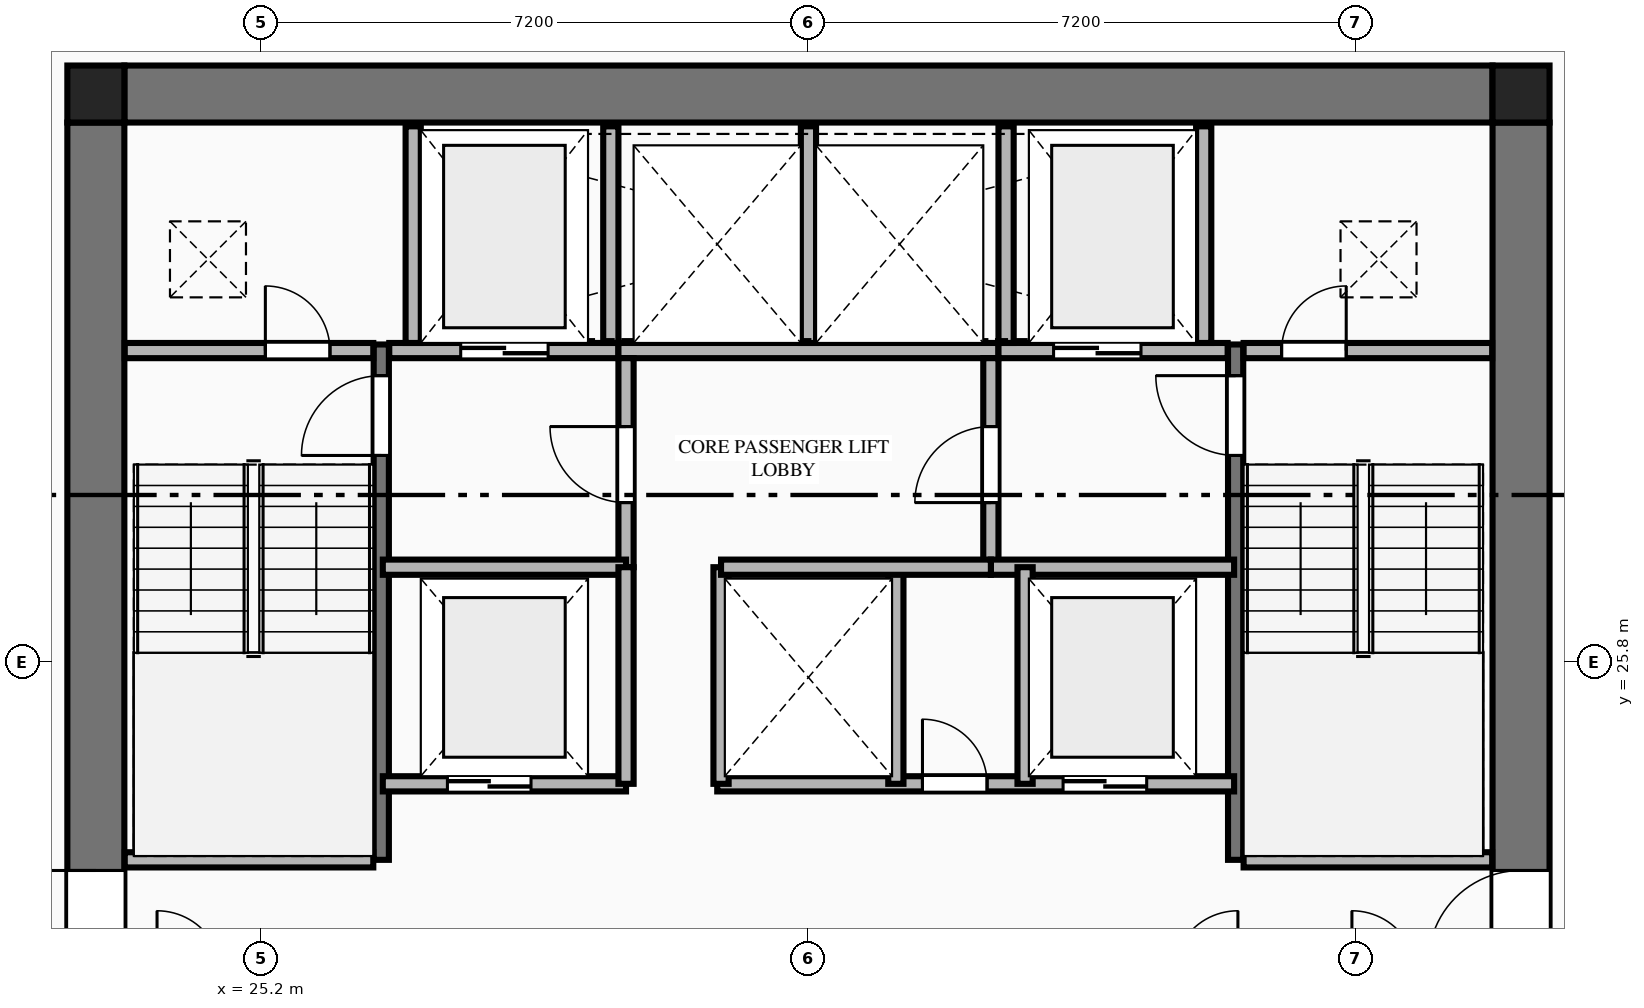
"""IFC4 building model, lengths in metres.
Left out: names, types, materials, properties, quantities, classifications, styles, units other than length and angle.
Written with IfcOpenShell. Run it as: python <this file> out.ifc"""

import sys

from ifc_helpers import new_model, si_unit, direction, frame, frame_2d, origin, origin_2d, place, context, subcontext, project, spatial, rectangle, extrude, element, fill, save


model = new_model("IFC4")
c1 = context("Model", 3, precision=1e-05, world=origin(), true_north=direction((0.0, 1.0)))
c2 = subcontext(c1, "Body", "Model", "MODEL_VIEW")
j1 = project(units=[si_unit("LENGTHUNIT", "METRE"), si_unit("PLANEANGLEUNIT", "RADIAN")], contexts=[c1])
p1 = place(None, origin())
s1 = spatial("IfcSite", under=j1, at=p1, CompositionType="ELEMENT")
p2 = place(p1, origin())
s2 = spatial("IfcBuilding", under=s1, at=p2, CompositionType="ELEMENT")
p3 = place(p2, frame((0.0, 0.0, 133.9)))
s3 = spatial("IfcBuildingStorey", under=s2, at=p3, CompositionType="ELEMENT", Elevation=133.9)
for number, where, z_axis, x_axis in (
    (1, (41.775, 33.275, 0.0), (0.0, 0.0, 1.0), (1.0, 0.0, 0.0)),
    (2, (23.025, 33.275, 0.0), (0.0, 0.0, 1.0), (1.0, 0.0, 0.0)),
):
    element("IfcColumn", number, at=place(p3, frame(where, z_axis=z_axis, x_axis=x_axis)), inside=s3, PredefinedType="COLUMN", context=c2, shape_type="SweptSolid", body=[
        extrude(rectangle(XDim=0.75, YDim=0.75, at=origin_2d()), origin(), (0.0, 0.0, 1.0), 3.55),
    ])
p4 = place(p3, frame((23.4, 33.275, 0.0), z_axis=(0.0, 0.0, 1.0), x_axis=(1.0, 0.0, 0.0)))
e3 = element("IfcWall", 3, at=p4, inside=s3, PredefinedType="SHEAR", context=c2, shape_type="SweptSolid", body=[
    extrude(rectangle(XDim=18.0, YDim=0.75, at=frame_2d((9.0, 0.0))), origin(), (0.0, 0.0, 1.0), 3.34),
])
p5 = place(p3, frame((23.025, 18.9, 0.0), z_axis=(0.0, 0.0, 1.0), x_axis=(0.0, 1.0, 0.0)))
e4 = element("IfcWall", 4, at=p5, inside=s3, PredefinedType="SHEAR", context=c2, shape_type="SweptSolid", body=[
    extrude(rectangle(XDim=14.0, YDim=0.75, at=frame_2d((7.0, 0.0))), origin(), (0.0, 0.0, 1.0), 3.34),
])
p6 = place(p5, frame((2.94, 0.0, 0.0)))
e5 = element("IfcOpeningElement", 5, at=p6, cuts=e4, PredefinedType="OPENING", context=c2, shape_type="SweptSolid", body=[
    extrude(rectangle(XDim=1.22, YDim=2.25, at=frame_2d((0.61, 1.125))), frame((0.0, 0.385, 0.0), z_axis=(0.0, -1.0, 0.0), x_axis=(1.0, 0.0, 0.0)), (0.0, 0.0, 1.0), 0.77),
])
p7 = place(p3, frame((41.775, 18.9, 0.0), z_axis=(0.0, 0.0, 1.0), x_axis=(0.0, 1.0, 0.0)))
e6 = element("IfcWall", 6, at=p7, inside=s3, PredefinedType="SHEAR", context=c2, shape_type="SweptSolid", body=[
    extrude(rectangle(XDim=14.0, YDim=0.75, at=frame_2d((7.0, 0.0))), origin(), (0.0, 0.0, 1.0), 3.34),
])
p8 = place(p7, frame((2.94, 0.0, 0.0)))
e7 = element("IfcOpeningElement", 7, at=p8, cuts=e6, PredefinedType="OPENING", context=c2, shape_type="SweptSolid", body=[
    extrude(rectangle(XDim=1.22, YDim=2.25, at=frame_2d((0.61, 1.125))), frame((0.0, 0.385, 0.0), z_axis=(0.0, -1.0, 0.0), x_axis=(1.0, 0.0, 0.0)), (0.0, 0.0, 1.0), 0.77),
])
p9 = place(p3, frame((26.78, 23.2, 0.0), z_axis=(0.0, 0.0, 1.0), x_axis=(0.0, 1.0, 0.0)))
e8 = element("IfcWall", 8, at=p9, inside=s3, PredefinedType="SHEAR", context=c2, shape_type="SweptSolid", body=[
    extrude(rectangle(XDim=6.78, YDim=0.2, at=frame_2d((3.39, 0.0))), origin(), (0.0, 0.0, 1.0), 3.55),
])
p10 = place(p9, frame((5.32, 0.0, 0.0)))
e9 = element("IfcOpeningElement", 9, at=p10, cuts=e8, PredefinedType="OPENING", context=c2, shape_type="SweptSolid", body=[
    extrude(rectangle(XDim=1.05, YDim=2.15, at=frame_2d((0.525, 1.075))), frame((0.0, 0.11, 0.0), z_axis=(0.0, -1.0, 0.0), x_axis=(1.0, 0.0, 0.0)), (0.0, 0.0, 1.0), 0.22),
])
p11 = place(p3, frame((23.405, 23.2, 0.0), z_axis=(0.0, 0.0, 1.0), x_axis=(1.0, 0.0, 0.0)))
e10 = element("IfcWall", 10, at=p11, inside=s3, PredefinedType="PLUMBINGWALL", context=c2, shape_type="SweptSolid", body=[
    extrude(rectangle(XDim=3.27, YDim=0.2, at=frame_2d((1.635, 0.0))), origin(), (0.0, 0.0, 1.0), 3.34),
])
p12 = place(p3, frame((38.02, 23.2, 0.0), z_axis=(0.0, 0.0, 1.0), x_axis=(0.0, 1.0, 0.0)))
e11 = element("IfcWall", 11, at=p12, inside=s3, PredefinedType="SHEAR", context=c2, shape_type="SweptSolid", body=[
    extrude(rectangle(XDim=6.78, YDim=0.2, at=frame_2d((3.39, 0.0))), origin(), (0.0, 0.0, 1.0), 3.55),
])
p13 = place(p12, frame((5.32, 0.0, 0.0)))
e12 = element("IfcOpeningElement", 12, at=p13, cuts=e11, PredefinedType="OPENING", context=c2, shape_type="SweptSolid", body=[
    extrude(rectangle(XDim=1.05, YDim=2.15, at=frame_2d((0.525, 1.075))), frame((0.0, 0.11, 0.0), z_axis=(0.0, -1.0, 0.0), x_axis=(1.0, 0.0, 0.0)), (0.0, 0.0, 1.0), 0.22),
])
p14 = place(p3, frame((38.125, 23.2, 0.0), z_axis=(0.0, 0.0, 1.0), x_axis=(1.0, 0.0, 0.0)))
e13 = element("IfcWall", 13, at=p14, inside=s3, PredefinedType="PLUMBINGWALL", context=c2, shape_type="SweptSolid", body=[
    extrude(rectangle(XDim=3.27, YDim=0.2, at=frame_2d((1.635, 0.0))), origin(), (0.0, 0.0, 1.0), 3.34),
])
p15 = place(p3, frame((23.405, 29.9, 0.0), z_axis=(0.0, 0.0, 1.0), x_axis=(1.0, 0.0, 0.0)))
e14 = element("IfcWall", 14, at=p15, inside=s3, PredefinedType="PLUMBINGWALL", context=c2, shape_type="SweptSolid", body=[
    extrude(rectangle(XDim=3.27, YDim=0.2, at=frame_2d((1.635, 0.0))), origin(), (0.0, 0.0, 1.0), 3.34),
])
p16 = place(p15, frame((1.85, 0.0, 0.0)))
e15 = element("IfcOpeningElement", 15, at=p16, cuts=e14, PredefinedType="OPENING", context=c2, shape_type="SweptSolid", body=[
    extrude(rectangle(XDim=0.85, YDim=2.05, at=frame_2d((0.425, 1.025))), frame((0.0, 0.11, 0.0), z_axis=(0.0, -1.0, 0.0), x_axis=(1.0, 0.0, 0.0)), (0.0, 0.0, 1.0), 0.22),
])
p17 = place(p3, frame((26.885, 29.9, 0.0), z_axis=(0.0, 0.0, 1.0), x_axis=(1.0, 0.0, 0.0)))
e16 = element("IfcWall", 16, at=p17, inside=s3, PredefinedType="PLUMBINGWALL", context=c2, shape_type="SweptSolid", body=[
    extrude(rectangle(XDim=3.015, YDim=0.2, at=frame_2d((1.507, 0.0))), origin(), (0.0, 0.0, 1.0), 3.34),
])
p18 = place(p17, frame((0.94, 0.0, 0.0)))
e17 = element("IfcOpeningElement", 17, at=p18, cuts=e16, PredefinedType="OPENING", context=c2, shape_type="SweptSolid", body=[
    extrude(rectangle(XDim=1.15, YDim=2.2, at=frame_2d((0.575, 1.1))), frame((0.0, 0.11, 0.0), z_axis=(0.0, -1.0, 0.0), x_axis=(1.0, 0.0, 0.0)), (0.0, 0.0, 1.0), 0.22),
])
p19 = place(p3, frame((29.9, 29.9, 0.0), z_axis=(0.0, 0.0, 1.0), x_axis=(1.0, 0.0, 0.0)))
e18 = element("IfcWall", 18, at=p19, inside=s3, PredefinedType="PLUMBINGWALL", context=c2, shape_type="SweptSolid", body=[
    extrude(rectangle(XDim=5.0, YDim=0.2, at=frame_2d((2.5, 0.0))), origin(), (0.0, 0.0, 1.0), 3.34),
])
p20 = place(p3, frame((34.9, 29.9, 0.0), z_axis=(0.0, 0.0, 1.0), x_axis=(1.0, 0.0, 0.0)))
e19 = element("IfcWall", 19, at=p20, inside=s3, PredefinedType="PLUMBINGWALL", context=c2, shape_type="SweptSolid", body=[
    extrude(rectangle(XDim=3.015, YDim=0.2, at=frame_2d((1.508, 0.0))), origin(), (0.0, 0.0, 1.0), 3.34),
])
p21 = place(p20, frame((0.725, 0.0, 0.0)))
e20 = element("IfcOpeningElement", 20, at=p21, cuts=e19, PredefinedType="OPENING", context=c2, shape_type="SweptSolid", body=[
    extrude(rectangle(XDim=1.15, YDim=2.2, at=frame_2d((0.575, 1.1))), frame((0.0, 0.11, 0.0), z_axis=(0.0, -1.0, 0.0), x_axis=(1.0, 0.0, 0.0)), (0.0, 0.0, 1.0), 0.22),
])
p22 = place(p3, frame((38.125, 29.9, 0.0), z_axis=(0.0, 0.0, 1.0), x_axis=(1.0, 0.0, 0.0)))
e21 = element("IfcWall", 21, at=p22, inside=s3, PredefinedType="PLUMBINGWALL", context=c2, shape_type="SweptSolid", body=[
    extrude(rectangle(XDim=3.27, YDim=0.2, at=frame_2d((1.635, 0.0))), origin(), (0.0, 0.0, 1.0), 3.34),
])
p23 = place(p22, frame((0.5, 0.0, 0.0)))
e22 = element("IfcOpeningElement", 22, at=p23, cuts=e21, PredefinedType="OPENING", context=c2, shape_type="SweptSolid", body=[
    extrude(rectangle(XDim=0.85, YDim=2.05, at=frame_2d((0.425, 1.025))), frame((0.0, 0.11, 0.0), z_axis=(0.0, -1.0, 0.0), x_axis=(1.0, 0.0, 0.0)), (0.0, 0.0, 1.0), 0.22),
])
for number, where, z_axis, x_axis in (
    (23, (27.2, 30.0, 0.0), (0.0, 0.0, 1.0), (0.0, 1.0, 0.0)),
    (24, (29.8, 30.0, 0.0), (0.0, 0.0, 1.0), (0.0, 1.0, 0.0)),
    (25, (32.4, 30.0, 0.0), (0.0, 0.0, 1.0), (0.0, 1.0, 0.0)),
    (26, (35.0, 30.0, 0.0), (0.0, 0.0, 1.0), (0.0, 1.0, 0.0)),
    (27, (37.6, 30.0, 0.0), (0.0, 0.0, 1.0), (0.0, 1.0, 0.0)),
):
    element("IfcWall", number, at=place(p3, frame(where, z_axis=z_axis, x_axis=x_axis)), inside=s3, PredefinedType="PLUMBINGWALL", context=c2, shape_type="SweptSolid", body=[
        extrude(rectangle(XDim=2.85, YDim=0.2, at=frame_2d((1.425, 0.0))), origin(), (0.0, 0.0, 1.0), 3.34),
    ])
p24 = place(p3, frame((30.0, 27.05, 0.0), z_axis=(0.0, 0.0, 1.0), x_axis=(0.0, 1.0, 0.0)))
e28 = element("IfcWall", 28, at=p24, inside=s3, PredefinedType="PLUMBINGWALL", context=c2, shape_type="SweptSolid", body=[
    extrude(rectangle(XDim=2.75, YDim=0.2, at=frame_2d((1.375, 0.0))), origin(), (0.0, 0.0, 1.0), 3.34),
])
p25 = place(p24, frame((0.85, 0.0, 0.0)))
e29 = element("IfcOpeningElement", 29, at=p25, cuts=e28, PredefinedType="OPENING", context=c2, shape_type="SweptSolid", body=[
    extrude(rectangle(XDim=1.0, YDim=2.15, at=frame_2d((0.5, 1.075))), frame((0.0, 0.11, 0.0), z_axis=(0.0, -1.0, 0.0), x_axis=(1.0, 0.0, 0.0)), (0.0, 0.0, 1.0), 0.22),
])
p26 = place(p3, frame((26.8, 27.05, 0.0), z_axis=(0.0, 0.0, 1.0), x_axis=(1.0, 0.0, 0.0)))
e30 = element("IfcWall", 30, at=p26, inside=s3, PredefinedType="PLUMBINGWALL", context=c2, shape_type="SweptSolid", body=[
    extrude(rectangle(XDim=3.2, YDim=0.2, at=frame_2d((1.6, 0.0))), origin(), (0.0, 0.0, 1.0), 3.34),
])
p27 = place(p3, frame((34.8, 27.05, 0.0), z_axis=(0.0, 0.0, 1.0), x_axis=(0.0, 1.0, 0.0)))
e31 = element("IfcWall", 31, at=p27, inside=s3, PredefinedType="PLUMBINGWALL", context=c2, shape_type="SweptSolid", body=[
    extrude(rectangle(XDim=2.75, YDim=0.2, at=frame_2d((1.375, 0.0))), origin(), (0.0, 0.0, 1.0), 3.34),
])
p28 = place(p27, frame((0.85, 0.0, 0.0)))
e32 = element("IfcOpeningElement", 32, at=p28, cuts=e31, PredefinedType="OPENING", context=c2, shape_type="SweptSolid", body=[
    extrude(rectangle(XDim=1.0, YDim=2.15, at=frame_2d((0.5, 1.075))), frame((0.0, 0.11, 0.0), z_axis=(0.0, -1.0, 0.0), x_axis=(1.0, 0.0, 0.0)), (0.0, 0.0, 1.0), 0.22),
])
p29 = place(p3, frame((34.8, 27.05, 0.0), z_axis=(0.0, 0.0, 1.0), x_axis=(1.0, 0.0, 0.0)))
e33 = element("IfcWall", 33, at=p29, inside=s3, PredefinedType="PLUMBINGWALL", context=c2, shape_type="SweptSolid", body=[
    extrude(rectangle(XDim=3.2, YDim=0.2, at=frame_2d((1.6, 0.0))), origin(), (0.0, 0.0, 1.0), 3.34),
])
p30 = place(p3, frame((26.8, 24.2, 0.0), z_axis=(0.0, 0.0, 1.0), x_axis=(1.0, 0.0, 0.0)))
e34 = element("IfcWall", 34, at=p30, inside=s3, PredefinedType="PLUMBINGWALL", context=c2, shape_type="SweptSolid", body=[
    extrude(rectangle(XDim=3.2, YDim=0.2, at=frame_2d((1.6, 0.0))), origin(), (0.0, 0.0, 1.0), 3.34),
])
p31 = place(p30, frame((0.85, 0.0, 0.0)))
e35 = element("IfcOpeningElement", 35, at=p31, cuts=e34, PredefinedType="OPENING", context=c2, shape_type="SweptSolid", body=[
    extrude(rectangle(XDim=1.1, YDim=2.2, at=frame_2d((0.55, 1.1))), frame((0.0, 0.11, 0.0), z_axis=(0.0, -1.0, 0.0), x_axis=(1.0, 0.0, 0.0)), (0.0, 0.0, 1.0), 0.22),
])
p32 = place(p3, frame((30.0, 24.2, 0.0), z_axis=(0.0, 0.0, 1.0), x_axis=(0.0, 1.0, 0.0)))
e36 = element("IfcWall", 36, at=p32, inside=s3, PredefinedType="PLUMBINGWALL", context=c2, shape_type="SweptSolid", body=[
    extrude(rectangle(XDim=2.85, YDim=0.2, at=frame_2d((1.425, 0.0))), origin(), (0.0, 0.0, 1.0), 3.34),
])
p33 = place(p3, frame((31.2, 24.2, 0.0), z_axis=(0.0, 0.0, 1.0), x_axis=(1.0, 0.0, 0.0)))
e37 = element("IfcWall", 37, at=p33, inside=s3, PredefinedType="PLUMBINGWALL", context=c2, shape_type="SweptSolid", body=[
    extrude(rectangle(XDim=6.8, YDim=0.2, at=frame_2d((3.4, 0.0))), origin(), (0.0, 0.0, 1.0), 3.34),
])
p34 = place(p33, frame((2.7, 0.0, 0.0)))
e38 = element("IfcOpeningElement", 38, at=p34, cuts=e37, PredefinedType="OPENING", context=c2, shape_type="SweptSolid", body=[
    extrude(rectangle(XDim=0.85, YDim=2.05, at=frame_2d((0.425, 1.025))), frame((0.0, 0.11, 0.0), z_axis=(0.0, -1.0, 0.0), x_axis=(1.0, 0.0, 0.0)), (0.0, 0.0, 1.0), 0.22),
])
p35 = place(p33, frame((4.55, 0.0, 0.0)))
e39 = element("IfcOpeningElement", 39, at=p35, cuts=e37, PredefinedType="OPENING", context=c2, shape_type="SweptSolid", body=[
    extrude(rectangle(XDim=1.1, YDim=2.2, at=frame_2d((0.55, 1.1))), frame((0.0, 0.11, 0.0), z_axis=(0.0, -1.0, 0.0), x_axis=(1.0, 0.0, 0.0)), (0.0, 0.0, 1.0), 0.22),
])
for number, where, z_axis, x_axis in (
    (40, (31.25, 24.2, 0.0), (0.0, 0.0, 1.0), (0.0, 1.0, 0.0)),
    (41, (33.55, 24.2, 0.0), (0.0, 0.0, 1.0), (0.0, 1.0, 0.0)),
    (42, (35.25, 24.2, 0.0), (0.0, 0.0, 1.0), (0.0, 1.0, 0.0)),
):
    element("IfcWall", number, at=place(p3, frame(where, z_axis=z_axis, x_axis=x_axis)), inside=s3, PredefinedType="PLUMBINGWALL", context=c2, shape_type="SweptSolid", body=[
        extrude(rectangle(XDim=2.85, YDim=0.2, at=frame_2d((1.425, 0.0))), origin(), (0.0, 0.0, 1.0), 3.34),
    ])
p36 = place(p3, frame((31.25, 27.05, 0.0), z_axis=(0.0, 0.0, 1.0), x_axis=(1.0, 0.0, 0.0)))
e43 = element("IfcWall", 43, at=p36, inside=s3, PredefinedType="PLUMBINGWALL", context=c2, shape_type="SweptSolid", body=[
    extrude(rectangle(XDim=3.55, YDim=0.2, at=frame_2d((1.775, 0.0))), origin(), (0.0, 0.0, 1.0), 3.34),
])
p37 = place(p6, origin())
e44 = element("IfcDoor", 44, at=p37, inside=s3, OperationType="SINGLE_SWING_RIGHT", PredefinedType="DOOR", context=c2, shape_type="SweptSolid", body=[
    extrude(rectangle(XDim=1.22, YDim=2.25, at=frame_2d((0.61, 1.125))), frame((0.0, 0.025, 0.0), z_axis=(0.0, -1.0, 0.0), x_axis=(1.0, 0.0, 0.0)), (0.0, 0.0, 1.0), 0.05),
])
fill(e5, e44)
p38 = place(p8, origin())
e45 = element("IfcDoor", 45, at=p38, inside=s3, OperationType="SINGLE_SWING_LEFT", PredefinedType="DOOR", context=c2, shape_type="SweptSolid", body=[
    extrude(rectangle(XDim=1.22, YDim=2.25, at=frame_2d((0.61, 1.125))), frame((0.0, 0.025, 0.0), z_axis=(0.0, -1.0, 0.0), x_axis=(1.0, 0.0, 0.0)), (0.0, 0.0, 1.0), 0.05),
])
fill(e7, e45)
p39 = place(p10, origin())
e46 = element("IfcDoor", 46, at=p39, inside=s3, OperationType="SINGLE_SWING_LEFT", PredefinedType="DOOR", context=c2, shape_type="SweptSolid", body=[
    extrude(rectangle(XDim=1.05, YDim=2.15, at=frame_2d((0.525, 1.075))), frame((0.0, 0.025, 0.0), z_axis=(0.0, -1.0, 0.0), x_axis=(1.0, 0.0, 0.0)), (0.0, 0.0, 1.0), 0.05),
])
fill(e9, e46)
p40 = place(p13, origin())
e47 = element("IfcDoor", 47, at=p40, inside=s3, OperationType="SINGLE_SWING_RIGHT", PredefinedType="DOOR", context=c2, shape_type="SweptSolid", body=[
    extrude(rectangle(XDim=1.05, YDim=2.15, at=frame_2d((0.525, 1.075))), frame((0.0, 0.025, 0.0), z_axis=(0.0, -1.0, 0.0), x_axis=(1.0, 0.0, 0.0)), (0.0, 0.0, 1.0), 0.05),
])
fill(e12, e47)
p41 = place(p16, origin())
e48 = element("IfcDoor", 48, at=p41, inside=s3, OperationType="SINGLE_SWING_LEFT", PredefinedType="DOOR", context=c2, shape_type="SweptSolid", body=[
    extrude(rectangle(XDim=0.85, YDim=2.05, at=frame_2d((0.425, 1.025))), frame((0.0, 0.025, 0.0), z_axis=(0.0, -1.0, 0.0), x_axis=(1.0, 0.0, 0.0)), (0.0, 0.0, 1.0), 0.05),
])
fill(e15, e48)
p42 = place(p23, origin())
e49 = element("IfcDoor", 49, at=p42, inside=s3, OperationType="SINGLE_SWING_RIGHT", PredefinedType="DOOR", context=c2, shape_type="SweptSolid", body=[
    extrude(rectangle(XDim=0.85, YDim=2.05, at=frame_2d((0.425, 1.025))), frame((0.0, 0.025, 0.0), z_axis=(0.0, -1.0, 0.0), x_axis=(1.0, 0.0, 0.0)), (0.0, 0.0, 1.0), 0.05),
])
fill(e22, e49)
p43 = place(p18, origin())
e50 = element("IfcDoor", 50, at=p43, inside=s3, OperationType="DOUBLE_DOOR_SLIDING", PredefinedType="DOOR", context=c2, shape_type="SweptSolid", body=[
    extrude(rectangle(XDim=1.15, YDim=2.2, at=frame_2d((0.575, 1.1))), frame((0.0, 0.025, 0.0), z_axis=(0.0, -1.0, 0.0), x_axis=(1.0, 0.0, 0.0)), (0.0, 0.0, 1.0), 0.05),
])
fill(e17, e50)
p44 = place(p21, origin())
e51 = element("IfcDoor", 51, at=p44, inside=s3, OperationType="DOUBLE_DOOR_SLIDING", PredefinedType="DOOR", context=c2, shape_type="SweptSolid", body=[
    extrude(rectangle(XDim=1.15, YDim=2.2, at=frame_2d((0.575, 1.1))), frame((0.0, 0.025, 0.0), z_axis=(0.0, -1.0, 0.0), x_axis=(1.0, 0.0, 0.0)), (0.0, 0.0, 1.0), 0.05),
])
fill(e20, e51)
p45 = place(p25, origin())
e52 = element("IfcDoor", 52, at=p45, inside=s3, OperationType="SINGLE_SWING_RIGHT", PredefinedType="DOOR", context=c2, shape_type="SweptSolid", body=[
    extrude(rectangle(XDim=1.0, YDim=2.15, at=frame_2d((0.5, 1.075))), frame((0.0, 0.025, 0.0), z_axis=(0.0, -1.0, 0.0), x_axis=(1.0, 0.0, 0.0)), (0.0, 0.0, 1.0), 0.05),
])
fill(e29, e52)
p46 = place(p28, origin())
e53 = element("IfcDoor", 53, at=p46, inside=s3, OperationType="SINGLE_SWING_LEFT", PredefinedType="DOOR", context=c2, shape_type="SweptSolid", body=[
    extrude(rectangle(XDim=1.0, YDim=2.15, at=frame_2d((0.5, 1.075))), frame((0.0, 0.025, 0.0), z_axis=(0.0, -1.0, 0.0), x_axis=(1.0, 0.0, 0.0)), (0.0, 0.0, 1.0), 0.05),
])
fill(e32, e53)
p47 = place(p31, origin())
e54 = element("IfcDoor", 54, at=p47, inside=s3, OperationType="DOUBLE_DOOR_SLIDING", PredefinedType="DOOR", context=c2, shape_type="SweptSolid", body=[
    extrude(rectangle(XDim=1.1, YDim=2.2, at=frame_2d((0.55, 1.1))), frame((0.0, 0.025, 0.0), z_axis=(0.0, -1.0, 0.0), x_axis=(1.0, 0.0, 0.0)), (0.0, 0.0, 1.0), 0.05),
])
fill(e35, e54)
p48 = place(p34, origin())
e55 = element("IfcDoor", 55, at=p48, inside=s3, OperationType="SINGLE_SWING_LEFT", PredefinedType="DOOR", context=c2, shape_type="SweptSolid", body=[
    extrude(rectangle(XDim=0.85, YDim=2.05, at=frame_2d((0.425, 1.025))), frame((0.0, 0.025, 0.0), z_axis=(0.0, -1.0, 0.0), x_axis=(1.0, 0.0, 0.0)), (0.0, 0.0, 1.0), 0.05),
])
fill(e38, e55)
p49 = place(p35, origin())
e56 = element("IfcDoor", 56, at=p49, inside=s3, OperationType="DOUBLE_DOOR_SLIDING", PredefinedType="DOOR", context=c2, shape_type="SweptSolid", body=[
    extrude(rectangle(XDim=1.1, YDim=2.2, at=frame_2d((0.55, 1.1))), frame((0.0, 0.025, 0.0), z_axis=(0.0, -1.0, 0.0), x_axis=(1.0, 0.0, 0.0)), (0.0, 0.0, 1.0), 0.05),
])
fill(e39, e56)
save(model, sys.argv[1])
